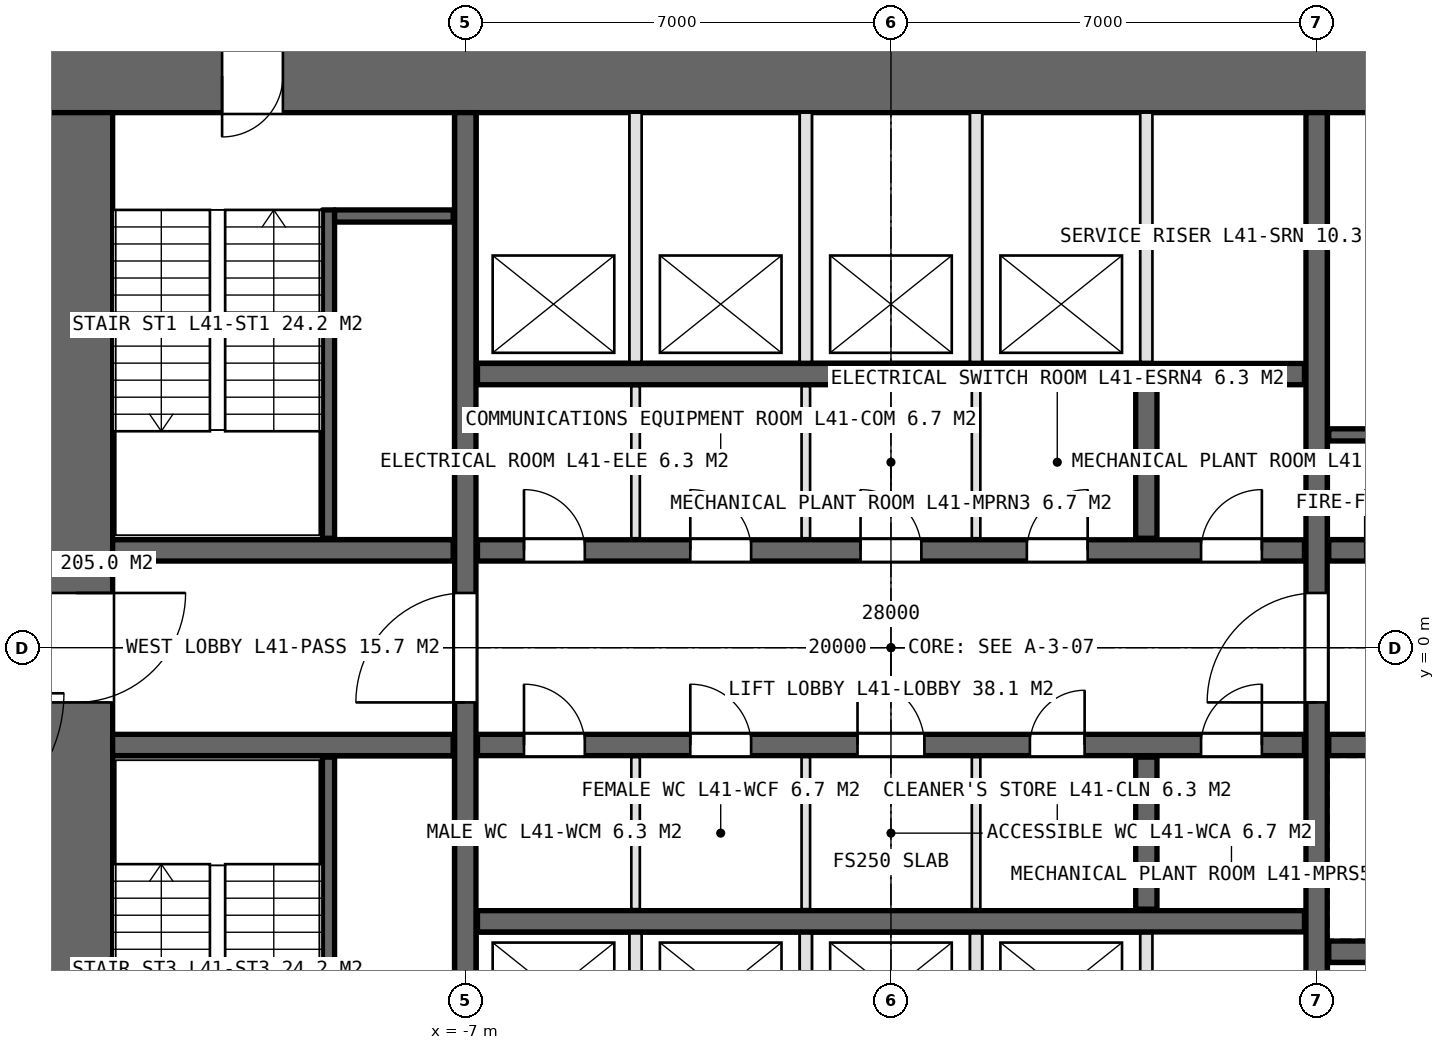
"""IFC4 building model, lengths in metres.
Left out: names, types, materials, properties, quantities, classifications, styles, units other than length and angle.
Written with IfcOpenShell. Run it as: python <this file> out.ifc"""

import sys

from ifc_helpers import new_model, si_unit, direction, frame, frame_2d, origin, place, context, subcontext, project, spatial, rectangle, extrude, element, fill, save


model = new_model("IFC4")
c1 = context("Model", 3, precision=1e-05, world=origin(), true_north=direction((0.0, 1.0)))
c2 = subcontext(c1, "Body", "Model", "MODEL_VIEW")
j1 = project(units=[si_unit("LENGTHUNIT", "METRE"), si_unit("PLANEANGLEUNIT", "RADIAN")], contexts=[c1])
p1 = place(None, origin())
s1 = spatial("IfcSite", under=j1, at=p1, CompositionType="ELEMENT")
p2 = place(p1, origin())
s2 = spatial("IfcBuilding", under=s1, at=p2, CompositionType="ELEMENT")
p3 = place(p2, frame((0.0, 0.0, 189.8)))
s3 = spatial("IfcBuildingStorey", under=s2, at=p3, CompositionType="ELEMENT", Elevation=189.8)
p4 = place(p3, frame((14.0, 9.4, 0.0), z_axis=(0.0, 0.0, 1.0), x_axis=(-1.0, 0.0, 0.0)))
e1 = element("IfcWall", 1, at=p4, inside=s3, PredefinedType="SHEAR", context=c2, shape_type="SweptSolid", body=[
    extrude(rectangle(XDim=28.0, YDim=1.2, at=frame_2d((14.0, 0.0))), origin(), (0.0, 0.0, 1.0), 5.0),
])
p5 = place(p4, frame((24.0, 0.0, 0.0)))
e2 = element("IfcOpeningElement", 2, at=p5, cuts=e1, PredefinedType="OPENING", context=c2, shape_type="SweptSolid", body=[
    extrude(rectangle(XDim=1.0, YDim=2.4, at=frame_2d((0.5, 1.2))), frame((0.0, 0.61, 0.0), z_axis=(0.0, -1.0, 0.0), x_axis=(1.0, 0.0, 0.0)), (0.0, 0.0, 1.0), 1.22),
])
p6 = place(p3, frame((-13.4, 8.8, 0.0), z_axis=(0.0, 0.0, 1.0), x_axis=(0.0, -1.0, 0.0)))
e3 = element("IfcWall", 3, at=p6, inside=s3, PredefinedType="SHEAR", context=c2, shape_type="SweptSolid", body=[
    extrude(rectangle(XDim=17.6, YDim=1.2, at=frame_2d((8.8, 0.0))), origin(), (0.0, 0.0, 1.0), 5.0),
])
p7 = place(p6, frame((7.9, 0.0, 0.0)))
e4 = element("IfcOpeningElement", 4, at=p7, cuts=e3, PredefinedType="OPENING", context=c2, shape_type="SweptSolid", body=[
    extrude(rectangle(XDim=1.8, YDim=2.4, at=frame_2d((0.9, 1.2))), frame((0.0, 0.61, 0.0), z_axis=(0.0, -1.0, 0.0), x_axis=(1.0, 0.0, 0.0)), (0.0, 0.0, 1.0), 1.22),
])
p8 = place(p6, frame((16.5, 0.0, 0.0)))
e5 = element("IfcOpeningElement", 5, at=p8, cuts=e3, PredefinedType="OPENING", context=c2, shape_type="SweptSolid", body=[
    extrude(rectangle(XDim=1.0, YDim=2.4, at=frame_2d((0.5, 1.2))), frame((0.0, 0.61, 0.0), z_axis=(0.0, -1.0, 0.0), x_axis=(1.0, 0.0, 0.0)), (0.0, 0.0, 1.0), 1.22),
])
p9 = place(p3, frame((-7.0, -8.8, 0.0), z_axis=(0.0, 0.0, 1.0), x_axis=(0.0, 1.0, 0.0)))
e6 = element("IfcWall", 6, at=p9, inside=s3, PredefinedType="SHEAR", context=c2, shape_type="SweptSolid", body=[
    extrude(rectangle(XDim=17.6, YDim=0.35, at=frame_2d((8.8, 0.0))), origin(), (0.0, 0.0, 1.0), 5.0),
])
p10 = place(p9, frame((7.9, 0.0, 0.0)))
e7 = element("IfcOpeningElement", 7, at=p10, cuts=e6, PredefinedType="OPENING", context=c2, shape_type="SweptSolid", body=[
    extrude(rectangle(XDim=1.8, YDim=2.4, at=frame_2d((0.9, 1.2))), frame((0.0, 0.185, 0.0), z_axis=(0.0, -1.0, 0.0), x_axis=(1.0, 0.0, 0.0)), (0.0, 0.0, 1.0), 0.37),
])
p11 = place(p3, frame((7.0, -8.8, 0.0), z_axis=(0.0, 0.0, 1.0), x_axis=(0.0, 1.0, 0.0)))
e8 = element("IfcWall", 8, at=p11, inside=s3, PredefinedType="SHEAR", context=c2, shape_type="SweptSolid", body=[
    extrude(rectangle(XDim=17.6, YDim=0.35, at=frame_2d((8.8, 0.0))), origin(), (0.0, 0.0, 1.0), 5.0),
])
p12 = place(p11, frame((7.9, 0.0, 0.0)))
e9 = element("IfcOpeningElement", 9, at=p12, cuts=e8, PredefinedType="OPENING", context=c2, shape_type="SweptSolid", body=[
    extrude(rectangle(XDim=1.8, YDim=2.4, at=frame_2d((0.9, 1.2))), frame((0.0, 0.185, 0.0), z_axis=(0.0, -1.0, 0.0), x_axis=(1.0, 0.0, 0.0)), (0.0, 0.0, 1.0), 0.37),
])
p13 = place(p3, frame((-6.8, 1.6, 0.0), z_axis=(0.0, 0.0, 1.0), x_axis=(1.0, 0.0, 0.0)))
e10 = element("IfcWall", 10, at=p13, inside=s3, PredefinedType="SHEAR", context=c2, shape_type="SweptSolid", body=[
    extrude(rectangle(XDim=13.6, YDim=0.35, at=frame_2d((6.8, 0.0))), origin(), (0.0, 0.0, 1.0), 5.0),
])
p14 = place(p13, frame((0.765, 0.0, 0.0)))
e11 = element("IfcOpeningElement", 11, at=p14, cuts=e10, PredefinedType="OPENING", context=c2, shape_type="SweptSolid", body=[
    extrude(rectangle(XDim=1.0, YDim=2.4, at=frame_2d((0.5, 1.2))), frame((0.0, 0.185, 0.0), z_axis=(0.0, -1.0, 0.0), x_axis=(1.0, 0.0, 0.0)), (0.0, 0.0, 1.0), 0.37),
])
p15 = place(p13, frame((3.5, 0.0, 0.0)))
e12 = element("IfcOpeningElement", 12, at=p15, cuts=e10, PredefinedType="OPENING", context=c2, shape_type="SweptSolid", body=[
    extrude(rectangle(XDim=1.0, YDim=2.4, at=frame_2d((0.5, 1.2))), frame((0.0, 0.185, 0.0), z_axis=(0.0, -1.0, 0.0), x_axis=(1.0, 0.0, 0.0)), (0.0, 0.0, 1.0), 0.37),
])
p16 = place(p13, frame((6.3, 0.0, 0.0)))
e13 = element("IfcOpeningElement", 13, at=p16, cuts=e10, PredefinedType="OPENING", context=c2, shape_type="SweptSolid", body=[
    extrude(rectangle(XDim=1.0, YDim=2.4, at=frame_2d((0.5, 1.2))), frame((0.0, 0.185, 0.0), z_axis=(0.0, -1.0, 0.0), x_axis=(1.0, 0.0, 0.0)), (0.0, 0.0, 1.0), 0.37),
])
p17 = place(p13, frame((9.035, 0.0, 0.0)))
e14 = element("IfcOpeningElement", 14, at=p17, cuts=e10, PredefinedType="OPENING", context=c2, shape_type="SweptSolid", body=[
    extrude(rectangle(XDim=1.0, YDim=2.4, at=frame_2d((0.5, 1.2))), frame((0.0, 0.185, 0.0), z_axis=(0.0, -1.0, 0.0), x_axis=(1.0, 0.0, 0.0)), (0.0, 0.0, 1.0), 0.37),
])
p18 = place(p13, frame((11.9, 0.0, 0.0)))
e15 = element("IfcOpeningElement", 15, at=p18, cuts=e10, PredefinedType="OPENING", context=c2, shape_type="SweptSolid", body=[
    extrude(rectangle(XDim=1.0, YDim=2.4, at=frame_2d((0.5, 1.2))), frame((0.0, 0.185, 0.0), z_axis=(0.0, -1.0, 0.0), x_axis=(1.0, 0.0, 0.0)), (0.0, 0.0, 1.0), 0.37),
])
p19 = place(p3, frame((-6.8, -1.6, 0.0), z_axis=(0.0, 0.0, 1.0), x_axis=(1.0, 0.0, 0.0)))
e16 = element("IfcWall", 16, at=p19, inside=s3, PredefinedType="SHEAR", context=c2, shape_type="SweptSolid", body=[
    extrude(rectangle(XDim=13.6, YDim=0.35, at=frame_2d((6.8, 0.0))), origin(), (0.0, 0.0, 1.0), 5.0),
])
p20 = place(p19, frame((0.765, 0.0, 0.0)))
e17 = element("IfcOpeningElement", 17, at=p20, cuts=e16, PredefinedType="OPENING", context=c2, shape_type="SweptSolid", body=[
    extrude(rectangle(XDim=1.0, YDim=2.4, at=frame_2d((0.5, 1.2))), frame((0.0, 0.185, 0.0), z_axis=(0.0, -1.0, 0.0), x_axis=(1.0, 0.0, 0.0)), (0.0, 0.0, 1.0), 0.37),
])
p21 = place(p19, frame((3.5, 0.0, 0.0)))
e18 = element("IfcOpeningElement", 18, at=p21, cuts=e16, PredefinedType="OPENING", context=c2, shape_type="SweptSolid", body=[
    extrude(rectangle(XDim=1.0, YDim=2.4, at=frame_2d((0.5, 1.2))), frame((0.0, 0.185, 0.0), z_axis=(0.0, -1.0, 0.0), x_axis=(1.0, 0.0, 0.0)), (0.0, 0.0, 1.0), 0.37),
])
p22 = place(p19, frame((6.25, 0.0, 0.0)))
e19 = element("IfcOpeningElement", 19, at=p22, cuts=e16, PredefinedType="OPENING", context=c2, shape_type="SweptSolid", body=[
    extrude(rectangle(XDim=1.1, YDim=2.4, at=frame_2d((0.55, 1.2))), frame((0.0, 0.185, 0.0), z_axis=(0.0, -1.0, 0.0), x_axis=(1.0, 0.0, 0.0)), (0.0, 0.0, 1.0), 0.37),
])
p23 = place(p19, frame((9.085, 0.0, 0.0)))
e20 = element("IfcOpeningElement", 20, at=p23, cuts=e16, PredefinedType="OPENING", context=c2, shape_type="SweptSolid", body=[
    extrude(rectangle(XDim=0.9, YDim=2.4, at=frame_2d((0.45, 1.2))), frame((0.0, 0.185, 0.0), z_axis=(0.0, -1.0, 0.0), x_axis=(1.0, 0.0, 0.0)), (0.0, 0.0, 1.0), 0.37),
])
p24 = place(p19, frame((11.9, 0.0, 0.0)))
e21 = element("IfcOpeningElement", 21, at=p24, cuts=e16, PredefinedType="OPENING", context=c2, shape_type="SweptSolid", body=[
    extrude(rectangle(XDim=1.0, YDim=2.4, at=frame_2d((0.5, 1.2))), frame((0.0, 0.185, 0.0), z_axis=(0.0, -1.0, 0.0), x_axis=(1.0, 0.0, 0.0)), (0.0, 0.0, 1.0), 0.37),
])
for number, where, z_axis, x_axis in (
    (22, (-6.8, 4.5, 0.0), (0.0, 0.0, 1.0), (1.0, 0.0, 0.0)),
    (23, (-6.8, -4.5, 0.0), (0.0, 0.0, 1.0), (1.0, 0.0, 0.0)),
):
    element("IfcWall", number, at=place(p3, frame(where, z_axis=z_axis, x_axis=x_axis)), inside=s3, PredefinedType="SHEAR", context=c2, shape_type="SweptSolid", body=[
        extrude(rectangle(XDim=13.6, YDim=0.35, at=frame_2d((6.8, 0.0))), origin(), (0.0, 0.0, 1.0), 5.0),
    ])
for number, where, z_axis, x_axis in (
    (24, (-12.8, 1.6, 0.0), (0.0, 0.0, 1.0), (1.0, 0.0, 0.0)),
    (25, (-12.8, -1.6, 0.0), (0.0, 0.0, 1.0), (1.0, 0.0, 0.0)),
):
    element("IfcWall", number, at=place(p3, frame(where, z_axis=z_axis, x_axis=x_axis)), inside=s3, PredefinedType="SHEAR", context=c2, shape_type="SweptSolid", body=[
        extrude(rectangle(XDim=5.6, YDim=0.35, at=frame_2d((2.8, 0.0))), origin(), (0.0, 0.0, 1.0), 5.0),
    ])
p25 = place(p3, frame((7.2, 1.6, 0.0), z_axis=(0.0, 0.0, 1.0), x_axis=(1.0, 0.0, 0.0)))
e26 = element("IfcWall", 26, at=p25, inside=s3, PredefinedType="SHEAR", context=c2, shape_type="SweptSolid", body=[
    extrude(rectangle(XDim=5.6, YDim=0.35, at=frame_2d((2.8, 0.0))), origin(), (0.0, 0.0, 1.0), 5.0),
])
p26 = place(p25, frame((0.6, 0.0, 0.0)))
e27 = element("IfcOpeningElement", 27, at=p26, cuts=e26, PredefinedType="OPENING", context=c2, shape_type="SweptSolid", body=[
    extrude(rectangle(XDim=1.0, YDim=2.4, at=frame_2d((0.5, 1.2))), frame((0.0, 0.185, 0.0), z_axis=(0.0, -1.0, 0.0), x_axis=(1.0, 0.0, 0.0)), (0.0, 0.0, 1.0), 0.37),
])
p27 = place(p3, frame((7.2, -1.6, 0.0), z_axis=(0.0, 0.0, 1.0), x_axis=(1.0, 0.0, 0.0)))
e28 = element("IfcWall", 28, at=p27, inside=s3, PredefinedType="SHEAR", context=c2, shape_type="SweptSolid", body=[
    extrude(rectangle(XDim=5.6, YDim=0.35, at=frame_2d((2.8, 0.0))), origin(), (0.0, 0.0, 1.0), 5.0),
])
p28 = place(p27, frame((0.9, 0.0, 0.0)))
e29 = element("IfcOpeningElement", 29, at=p28, cuts=e28, PredefinedType="OPENING", context=c2, shape_type="SweptSolid", body=[
    extrude(rectangle(XDim=1.3, YDim=2.4, at=frame_2d((0.65, 1.2))), frame((0.0, 0.185, 0.0), z_axis=(0.0, -1.0, 0.0), x_axis=(1.0, 0.0, 0.0)), (0.0, 0.0, 1.0), 0.37),
])
p29 = place(p27, frame((3.9, 0.0, 0.0)))
e30 = element("IfcOpeningElement", 30, at=p29, cuts=e28, PredefinedType="OPENING", context=c2, shape_type="SweptSolid", body=[
    extrude(rectangle(XDim=1.3, YDim=2.4, at=frame_2d((0.65, 1.2))), frame((0.0, 0.185, 0.0), z_axis=(0.0, -1.0, 0.0), x_axis=(1.0, 0.0, 0.0)), (0.0, 0.0, 1.0), 0.37),
])
p30 = place(p3, frame((7.2, -5.0, 0.0), z_axis=(0.0, 0.0, 1.0), x_axis=(1.0, 0.0, 0.0)))
e31 = element("IfcWall", 31, at=p30, inside=s3, PredefinedType="SHEAR", context=c2, shape_type="SweptSolid", body=[
    extrude(rectangle(XDim=5.6, YDim=0.35, at=frame_2d((2.8, 0.0))), origin(), (0.0, 0.0, 1.0), 5.0),
])
for number, where, z_axis, x_axis in (
    (32, (4.2, 1.8, 0.0), (0.0, 0.0, 1.0), (0.0, 1.0, 0.0)),
    (33, (4.2, -4.3, 0.0), (0.0, 0.0, 1.0), (0.0, 1.0, 0.0)),
):
    element("IfcWall", number, at=place(p3, frame(where, z_axis=z_axis, x_axis=x_axis)), inside=s3, PredefinedType="SHEAR", context=c2, shape_type="SweptSolid", body=[
        extrude(rectangle(XDim=2.5, YDim=0.35, at=frame_2d((1.25, 0.0))), origin(), (0.0, 0.0, 1.0), 5.0),
    ])
for number, where, z_axis, x_axis in (
    (34, (-4.2, 1.8, 0.0), (0.0, 0.0, 1.0), (0.0, 1.0, 0.0)),
    (35, (-1.4, 1.8, 0.0), (0.0, 0.0, 1.0), (0.0, 1.0, 0.0)),
    (36, (1.4, 1.8, 0.0), (0.0, 0.0, 1.0), (0.0, 1.0, 0.0)),
    (37, (-4.2, -1.8, 0.0), (0.0, 0.0, 1.0), (0.0, -1.0, 0.0)),
    (38, (-1.4, -1.8, 0.0), (0.0, 0.0, 1.0), (0.0, -1.0, 0.0)),
    (39, (1.4, -1.8, 0.0), (0.0, 0.0, 1.0), (0.0, -1.0, 0.0)),
):
    element("IfcWall", number, at=place(p3, frame(where, z_axis=z_axis, x_axis=x_axis)), inside=s3, PredefinedType="PARTITIONING", context=c2, shape_type="SweptSolid", body=[
        extrude(rectangle(XDim=2.5, YDim=0.14, at=frame_2d((1.25, 0.0))), origin(), (0.0, 0.0, 1.0), 4.75),
    ])
for number, where, z_axis, x_axis in (
    (40, (-4.2, 4.7, 0.0), (0.0, 0.0, 1.0), (0.0, 1.0, 0.0)),
    (41, (-1.4, 4.7, 0.0), (0.0, 0.0, 1.0), (0.0, 1.0, 0.0)),
    (42, (1.4, 4.7, 0.0), (0.0, 0.0, 1.0), (0.0, 1.0, 0.0)),
    (43, (4.2, 4.7, 0.0), (0.0, 0.0, 1.0), (0.0, 1.0, 0.0)),
    (44, (-4.2, -4.7, 0.0), (0.0, 0.0, 1.0), (0.0, -1.0, 0.0)),
    (45, (-1.4, -4.7, 0.0), (0.0, 0.0, 1.0), (0.0, -1.0, 0.0)),
    (46, (1.4, -4.7, 0.0), (0.0, 0.0, 1.0), (0.0, -1.0, 0.0)),
    (47, (4.2, -4.7, 0.0), (0.0, 0.0, 1.0), (0.0, -1.0, 0.0)),
):
    element("IfcWall", number, at=place(p3, frame(where, z_axis=z_axis, x_axis=x_axis)), inside=s3, PredefinedType="PARTITIONING", context=c2, shape_type="SweptSolid", body=[
        extrude(rectangle(XDim=4.1, YDim=0.2, at=frame_2d((2.05, 0.0))), origin(), (0.0, 0.0, 1.0), 5.0),
    ])
p31 = place(p3, frame((-9.25, 7.2, 0.0), z_axis=(0.0, 0.0, 1.0), x_axis=(0.0, -1.0, 0.0)))
e48 = element("IfcWall", 48, at=p31, inside=s3, PredefinedType="SOLIDWALL", context=c2, shape_type="SweptSolid", body=[
    extrude(rectangle(XDim=5.4, YDim=0.2, at=frame_2d((2.7, 0.0))), origin(), (0.0, 0.0, 1.0), 5.0),
])
p32 = place(p3, frame((-9.15, 7.1, 0.0), z_axis=(0.0, 0.0, 1.0), x_axis=(1.0, 0.0, 0.0)))
e49 = element("IfcWall", 49, at=p32, inside=s3, PredefinedType="SOLIDWALL", context=c2, shape_type="SweptSolid", body=[
    extrude(rectangle(XDim=1.95, YDim=0.2, at=frame_2d((0.975, 0.0))), origin(), (0.0, 0.0, 1.0), 5.0),
])
p33 = place(p3, frame((-9.25, -7.2, 0.0), z_axis=(0.0, 0.0, 1.0), x_axis=(0.0, 1.0, 0.0)))
e50 = element("IfcWall", 50, at=p33, inside=s3, PredefinedType="SOLIDWALL", context=c2, shape_type="SweptSolid", body=[
    extrude(rectangle(XDim=5.4, YDim=0.2, at=frame_2d((2.7, 0.0))), origin(), (0.0, 0.0, 1.0), 5.0),
])
p34 = place(p3, frame((9.15, 3.5, 0.0), z_axis=(0.0, 0.0, 1.0), x_axis=(-1.0, 0.0, 0.0)))
e51 = element("IfcWall", 51, at=p34, inside=s3, PredefinedType="SOLIDWALL", context=c2, shape_type="SweptSolid", body=[
    extrude(rectangle(XDim=1.95, YDim=0.2, at=frame_2d((0.975, 0.0))), origin(), (0.0, 0.0, 1.0), 5.0),
])
p35 = place(p7, origin())
e52 = element("IfcDoor", 52, at=p35, inside=s3, OperationType="DOUBLE_DOOR_SINGLE_SWING", PredefinedType="DOOR", context=c2, shape_type="SweptSolid", body=[
    extrude(rectangle(XDim=1.8, YDim=2.4, at=frame_2d((0.9, 1.2))), frame((0.0, 0.025, 0.0), z_axis=(0.0, -1.0, 0.0), x_axis=(1.0, 0.0, 0.0)), (0.0, 0.0, 1.0), 0.05),
])
fill(e4, e52)
p36 = place(p10, origin())
e53 = element("IfcDoor", 53, at=p36, inside=s3, OperationType="DOUBLE_DOOR_SINGLE_SWING", PredefinedType="DOOR", context=c2, shape_type="SweptSolid", body=[
    extrude(rectangle(XDim=1.8, YDim=2.4, at=frame_2d((0.9, 1.2))), frame((0.0, 0.025, 0.0), z_axis=(0.0, -1.0, 0.0), x_axis=(1.0, 0.0, 0.0)), (0.0, 0.0, 1.0), 0.05),
])
fill(e7, e53)
p37 = place(p12, origin())
e54 = element("IfcDoor", 54, at=p37, inside=s3, OperationType="DOUBLE_DOOR_SINGLE_SWING", PredefinedType="DOOR", context=c2, shape_type="SweptSolid", body=[
    extrude(rectangle(XDim=1.8, YDim=2.4, at=frame_2d((0.9, 1.2))), frame((0.0, 0.025, 0.0), z_axis=(0.0, -1.0, 0.0), x_axis=(1.0, 0.0, 0.0)), (0.0, 0.0, 1.0), 0.05),
])
fill(e9, e54)
p38 = place(p5, origin())
e55 = element("IfcDoor", 55, at=p38, inside=s3, OperationType="SINGLE_SWING_RIGHT", PredefinedType="DOOR", context=c2, shape_type="SweptSolid", body=[
    extrude(rectangle(XDim=1.0, YDim=2.4, at=frame_2d((0.5, 1.2))), frame((0.0, 0.025, 0.0), z_axis=(0.0, -1.0, 0.0), x_axis=(1.0, 0.0, 0.0)), (0.0, 0.0, 1.0), 0.05),
])
fill(e2, e55)
p39 = place(p20, origin())
e56 = element("IfcDoor", 56, at=p39, inside=s3, OperationType="SINGLE_SWING_LEFT", PredefinedType="DOOR", context=c2, shape_type="SweptSolid", body=[
    extrude(rectangle(XDim=1.0, YDim=2.4, at=frame_2d((0.5, 1.2))), frame((0.0, 0.025, 0.0), z_axis=(0.0, -1.0, 0.0), x_axis=(1.0, 0.0, 0.0)), (0.0, 0.0, 1.0), 0.05),
])
fill(e17, e56)
p40 = place(p21, origin())
e57 = element("IfcDoor", 57, at=p40, inside=s3, OperationType="SINGLE_SWING_LEFT", PredefinedType="DOOR", context=c2, shape_type="SweptSolid", body=[
    extrude(rectangle(XDim=1.0, YDim=2.4, at=frame_2d((0.5, 1.2))), frame((0.0, 0.025, 0.0), z_axis=(0.0, -1.0, 0.0), x_axis=(1.0, 0.0, 0.0)), (0.0, 0.0, 1.0), 0.05),
])
fill(e18, e57)
p41 = place(p22, origin())
e58 = element("IfcDoor", 58, at=p41, inside=s3, OperationType="SINGLE_SWING_LEFT", PredefinedType="DOOR", context=c2, shape_type="SweptSolid", body=[
    extrude(rectangle(XDim=1.1, YDim=2.4, at=frame_2d((0.55, 1.2))), frame((0.0, 0.025, 0.0), z_axis=(0.0, -1.0, 0.0), x_axis=(1.0, 0.0, 0.0)), (0.0, 0.0, 1.0), 0.05),
])
fill(e19, e58)
p42 = place(p23, origin())
e59 = element("IfcDoor", 59, at=p42, inside=s3, OperationType="SINGLE_SWING_RIGHT", PredefinedType="DOOR", context=c2, shape_type="SweptSolid", body=[
    extrude(rectangle(XDim=0.9, YDim=2.4, at=frame_2d((0.45, 1.2))), frame((0.0, 0.025, 0.0), z_axis=(0.0, -1.0, 0.0), x_axis=(1.0, 0.0, 0.0)), (0.0, 0.0, 1.0), 0.05),
])
fill(e20, e59)
p43 = place(p14, origin())
e60 = element("IfcDoor", 60, at=p43, inside=s3, OperationType="SINGLE_SWING_LEFT", PredefinedType="DOOR", context=c2, shape_type="SweptSolid", body=[
    extrude(rectangle(XDim=1.0, YDim=2.4, at=frame_2d((0.5, 1.2))), frame((0.0, 0.025, 0.0), z_axis=(0.0, -1.0, 0.0), x_axis=(1.0, 0.0, 0.0)), (0.0, 0.0, 1.0), 0.05),
])
fill(e11, e60)
p44 = place(p15, origin())
e61 = element("IfcDoor", 61, at=p44, inside=s3, OperationType="SINGLE_SWING_LEFT", PredefinedType="DOOR", context=c2, shape_type="SweptSolid", body=[
    extrude(rectangle(XDim=1.0, YDim=2.4, at=frame_2d((0.5, 1.2))), frame((0.0, 0.025, 0.0), z_axis=(0.0, -1.0, 0.0), x_axis=(1.0, 0.0, 0.0)), (0.0, 0.0, 1.0), 0.05),
])
fill(e12, e61)
p45 = place(p16, origin())
e62 = element("IfcDoor", 62, at=p45, inside=s3, OperationType="SINGLE_SWING_LEFT", PredefinedType="DOOR", context=c2, shape_type="SweptSolid", body=[
    extrude(rectangle(XDim=1.0, YDim=2.4, at=frame_2d((0.5, 1.2))), frame((0.0, 0.025, 0.0), z_axis=(0.0, -1.0, 0.0), x_axis=(1.0, 0.0, 0.0)), (0.0, 0.0, 1.0), 0.05),
])
fill(e13, e62)
p46 = place(p17, origin())
e63 = element("IfcDoor", 63, at=p46, inside=s3, OperationType="SINGLE_SWING_RIGHT", PredefinedType="DOOR", context=c2, shape_type="SweptSolid", body=[
    extrude(rectangle(XDim=1.0, YDim=2.4, at=frame_2d((0.5, 1.2))), frame((0.0, 0.025, 0.0), z_axis=(0.0, -1.0, 0.0), x_axis=(1.0, 0.0, 0.0)), (0.0, 0.0, 1.0), 0.05),
])
fill(e14, e63)
p47 = place(p18, origin())
e64 = element("IfcDoor", 64, at=p47, inside=s3, OperationType="SINGLE_SWING_RIGHT", PredefinedType="DOOR", context=c2, shape_type="SweptSolid", body=[
    extrude(rectangle(XDim=1.0, YDim=2.4, at=frame_2d((0.5, 1.2))), frame((0.0, 0.025, 0.0), z_axis=(0.0, -1.0, 0.0), x_axis=(1.0, 0.0, 0.0)), (0.0, 0.0, 1.0), 0.05),
])
fill(e15, e64)
p48 = place(p24, origin())
e65 = element("IfcDoor", 65, at=p48, inside=s3, OperationType="SINGLE_SWING_RIGHT", PredefinedType="DOOR", context=c2, shape_type="SweptSolid", body=[
    extrude(rectangle(XDim=1.0, YDim=2.4, at=frame_2d((0.5, 1.2))), frame((0.0, 0.025, 0.0), z_axis=(0.0, -1.0, 0.0), x_axis=(1.0, 0.0, 0.0)), (0.0, 0.0, 1.0), 0.05),
])
fill(e21, e65)
save(model, sys.argv[1])
